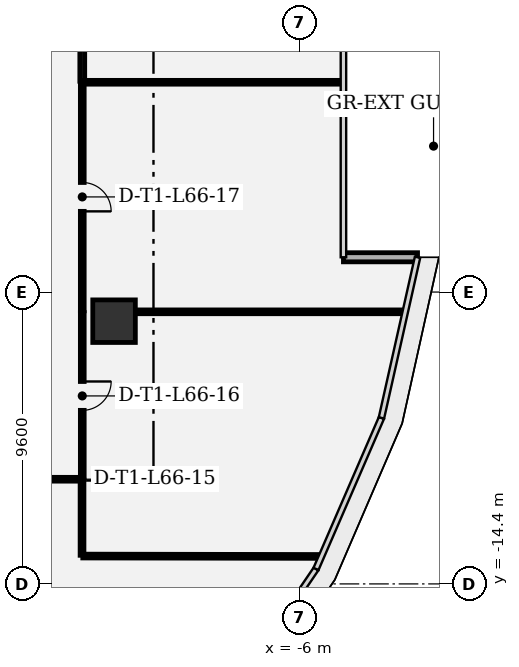
"""IFC4 building model, lengths in metres.
Left out: names, types, materials, properties, quantities, classifications, styles, units other than length and angle.
Written with IfcOpenShell. Run it as: python <this file> out.ifc"""

import sys

from ifc_helpers import new_model, si_unit, direction, frame, frame_2d, origin, origin_2d, place, context, subcontext, project, spatial, rectangle, extrude, element, fill, save


model = new_model("IFC4")
c1 = context("Model", 3, precision=1e-05, world=origin(), true_north=direction((0.0, 1.0)))
c2 = subcontext(c1, "Body", "Model", "MODEL_VIEW")
j1 = project(units=[si_unit("LENGTHUNIT", "METRE"), si_unit("PLANEANGLEUNIT", "RADIAN")], contexts=[c1])
p1 = place(None, origin())
s1 = spatial("IfcSite", under=j1, at=p1, CompositionType="ELEMENT")
p2 = place(p1, origin())
s2 = spatial("IfcBuilding", under=s1, at=p2, CompositionType="ELEMENT")
p3 = place(p2, frame((0.0, 0.0, 285.0)))
s3 = spatial("IfcBuildingStorey", under=s2, at=p3, CompositionType="ELEMENT", Elevation=285.0)
p4 = place(p3, frame((-12.097, -5.758, 0.0), z_axis=(0.0, 0.0, 1.0), x_axis=(1.0, 0.0, 0.0)))
e1 = element("IfcColumn", 1, at=p4, inside=s3, PredefinedType="COLUMN", context=c2, shape_type="SweptSolid", body=[
    extrude(rectangle(XDim=1.4, YDim=1.4, at=origin_2d()), origin(), (0.0, 0.0, 1.0), 4.2),
])
p5 = place(p3, frame((-2.115, -3.656, 0.0), z_axis=(0.0, 0.0, 1.0), x_axis=(-1.0, 0.0, 0.0)))
e2 = element("IfcWall", 2, at=p5, inside=s3, PredefinedType="SOLIDWALL", context=c2, shape_type="SweptSolid", body=[
    extrude(rectangle(XDim=2.437, YDim=0.3, at=frame_2d((1.219, 0.0))), origin(), (0.0, 0.0, 1.0), 3.91),
])
p6 = place(p3, frame((-5.356, -13.497, 0.0), z_axis=(0.0, 0.0, 1.0), x_axis=(-0.999998664878, 0.001634087442, 0.0)))
e3 = element("IfcWall", 3, at=p6, inside=s3, PredefinedType="PARTITIONING", context=c2, shape_type="SweptSolid", body=[
    extrude(rectangle(XDim=7.769, YDim=0.125, at=frame_2d((3.885, 0.0))), origin(), (0.0, 0.0, 1.0), 3.91),
])
p7 = place(p3, frame((-13.15, -13.459, 0.0), z_axis=(0.0, 0.0, 1.0), x_axis=(0.0, 1.0, 0.0)))
e4 = element("IfcWall", 4, at=p7, inside=s3, PredefinedType="PARTITIONING", context=c2, shape_type="SweptSolid", body=[
    extrude(rectangle(XDim=2.476, YDim=0.125, at=frame_2d((1.238, 0.0))), origin(), (0.0, 0.0, 1.0), 3.91),
])
p8 = place(p3, frame((-13.175, -10.958, 0.0), z_axis=(0.0, 0.0, 1.0), x_axis=(-0.999999486867, 0.001013047539, 0.0)))
e5 = element("IfcWall", 5, at=p8, inside=s3, PredefinedType="PARTITIONING", context=c2, shape_type="SweptSolid", body=[
    extrude(rectangle(XDim=6.025, YDim=0.125, at=frame_2d((3.012, 0.0))), origin(), (0.0, 0.0, 1.0), 3.529),
])
p9 = place(p8, frame((2.175, 0.0, 0.0)))
e6 = element("IfcOpeningElement", 6, at=p9, cuts=e5, PredefinedType="OPENING", context=c2, shape_type="SweptSolid", body=[
    extrude(rectangle(XDim=0.95, YDim=2.15, at=frame_2d((0.475, 1.075))), frame((0.0, 0.073, 0.0), z_axis=(0.0, -1.0, 0.0), x_axis=(1.0, 0.0, 0.0)), (0.0, 0.0, 1.0), 0.145),
])
p10 = place(p3, frame((-2.598, -5.45, 0.0), z_axis=(0.0, 0.0, 1.0), x_axis=(-1.0, 0.0, 0.0)))
e7 = element("IfcWall", 7, at=p10, inside=s3, PredefinedType="PARTITIONING", context=c2, shape_type="SweptSolid", body=[
    extrude(rectangle(XDim=8.734, YDim=0.125, at=frame_2d((4.367, 0.0))), origin(), (0.0, 0.0, 1.0), 3.91),
])
p11 = place(p3, frame((-13.142, -5.475, 0.0), z_axis=(0.0, 0.0, 1.0), x_axis=(0.0, -1.0, 0.0)))
e8 = element("IfcWall", 8, at=p11, inside=s3, PredefinedType="PARTITIONING", context=c2, shape_type="SweptSolid", body=[
    extrude(rectangle(XDim=5.483, YDim=0.125, at=frame_2d((2.741, 0.0))), origin(), (0.0, 0.0, 1.0), 3.13),
])
p12 = place(p11, frame((2.266, 0.0, 0.0)))
e9 = element("IfcOpeningElement", 9, at=p12, cuts=e8, PredefinedType="OPENING", context=c2, shape_type="SweptSolid", body=[
    extrude(rectangle(XDim=0.95, YDim=2.15, at=frame_2d((0.475, 1.075))), frame((0.0, 0.073, 0.0), z_axis=(0.0, -1.0, 0.0), x_axis=(1.0, 0.0, 0.0)), (0.0, 0.0, 1.0), 0.145),
])
p13 = place(p3, frame((-4.632, 2.101, 0.0), z_axis=(0.0, 0.0, 1.0), x_axis=(-1.0, 0.0, 0.0)))
e10 = element("IfcWall", 10, at=p13, inside=s3, PredefinedType="PARTITIONING", context=c2, shape_type="SweptSolid", body=[
    extrude(rectangle(XDim=8.485, YDim=0.125, at=frame_2d((4.243, 0.0))), origin(), (0.0, 0.0, 1.0), 3.91),
])
p14 = place(p3, frame((-13.142, 2.076, 0.0), z_axis=(0.0, 0.0, 1.0), x_axis=(0.0, -1.0, 0.0)))
e11 = element("IfcWall", 11, at=p14, inside=s3, PredefinedType="PARTITIONING", context=c2, shape_type="SweptSolid", body=[
    extrude(rectangle(XDim=7.493, YDim=0.125, at=frame_2d((3.746, 0.0))), origin(), (0.0, 0.0, 1.0), 3.91),
])
p15 = place(p14, frame((3.271, 0.0, 0.0)))
e12 = element("IfcOpeningElement", 12, at=p15, cuts=e11, PredefinedType="OPENING", context=c2, shape_type="SweptSolid", body=[
    extrude(rectangle(XDim=0.95, YDim=2.15, at=frame_2d((0.475, 1.075))), frame((0.0, 0.073, 0.0), z_axis=(0.0, -1.0, 0.0), x_axis=(1.0, 0.0, 0.0)), (0.0, 0.0, 1.0), 0.145),
])
p16 = place(p3, frame((-13.142, 8.576, 0.0), z_axis=(0.0, 0.0, 1.0), x_axis=(0.0, -1.0, 0.0)))
e13 = element("IfcWall", 13, at=p16, inside=s3, PredefinedType="PARTITIONING", context=c2, shape_type="SweptSolid", body=[
    extrude(rectangle(XDim=6.442, YDim=0.16, at=frame_2d((3.221, 0.0))), origin(), (0.0, 0.0, 1.0), 3.13),
])
p17 = place(p16, frame((3.816, 0.0, 0.0)))
e14 = element("IfcOpeningElement", 14, at=p17, cuts=e13, PredefinedType="OPENING", context=c2, shape_type="SweptSolid", body=[
    extrude(rectangle(XDim=1.1, YDim=2.15, at=frame_2d((0.55, 1.075))), frame((0.0, 0.09, 0.0), z_axis=(0.0, -1.0, 0.0), x_axis=(1.0, 0.0, 0.0)), (0.0, 0.0, 1.0), 0.18),
])
p18 = place(p12, origin())
e15 = element("IfcDoor", 15, at=p18, inside=s3, OperationType="SINGLE_SWING_LEFT", PredefinedType="DOOR", context=c2, shape_type="SweptSolid", body=[
    extrude(rectangle(XDim=0.95, YDim=2.15, at=frame_2d((0.475, 1.075))), frame((0.0, 0.025, 0.0), z_axis=(0.0, -1.0, 0.0), x_axis=(1.0, 0.0, 0.0)), (0.0, 0.0, 1.0), 0.05),
])
fill(e9, e15)
p19 = place(p15, origin())
e16 = element("IfcDoor", 16, at=p19, inside=s3, OperationType="SINGLE_SWING_RIGHT", PredefinedType="DOOR", context=c2, shape_type="SweptSolid", body=[
    extrude(rectangle(XDim=0.95, YDim=2.15, at=frame_2d((0.475, 1.075))), frame((0.0, 0.025, 0.0), z_axis=(0.0, -1.0, 0.0), x_axis=(1.0, 0.0, 0.0)), (0.0, 0.0, 1.0), 0.05),
])
fill(e12, e16)
save(model, sys.argv[1])
